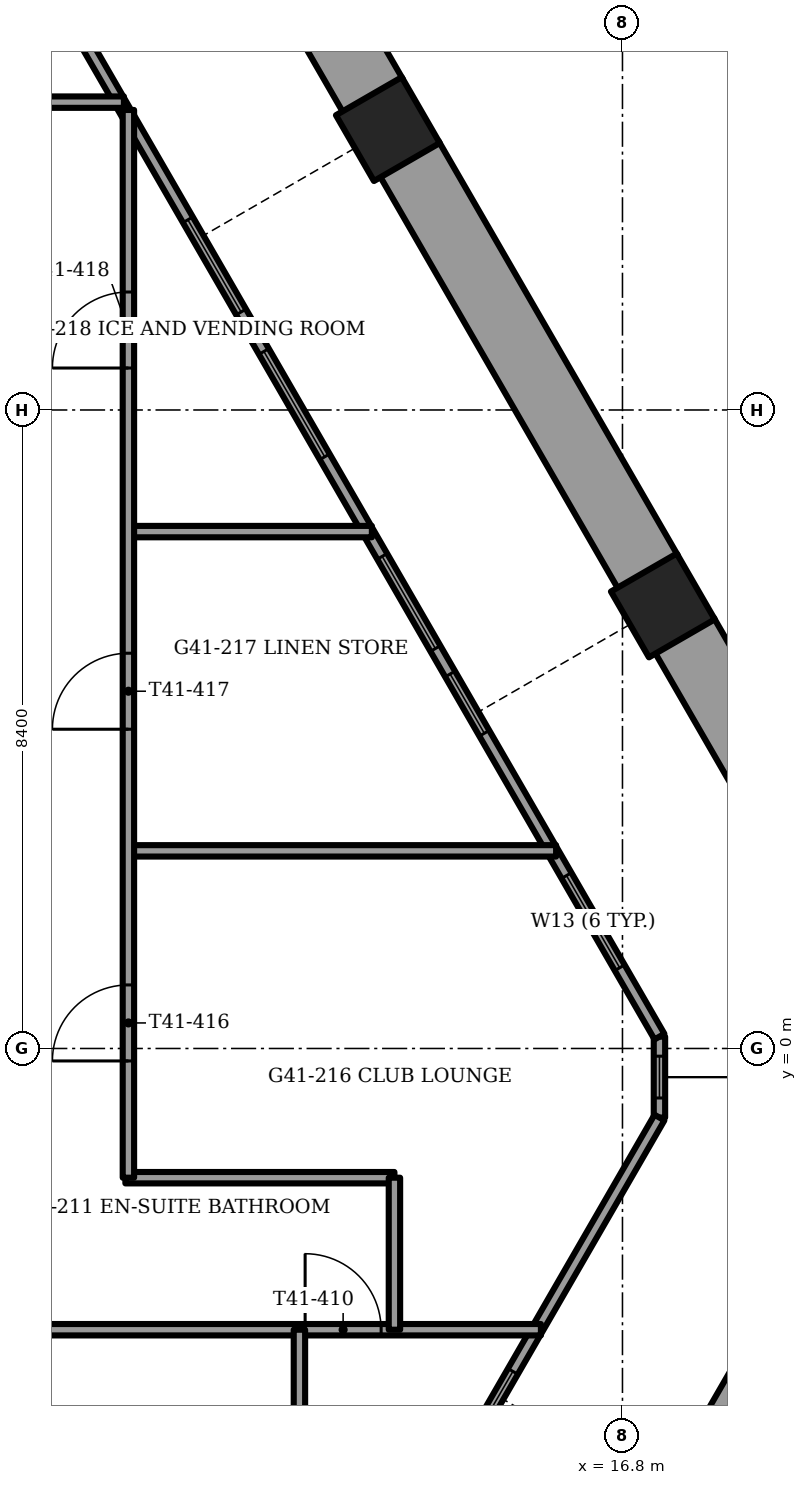
"""IFC4 building model, lengths in metres.
Left out: names, types, materials, properties, quantities, classifications, styles, units other than length and angle.
Written with IfcOpenShell. Run it as: python <this file> out.ifc"""

import sys

from ifc_helpers import new_model, si_unit, direction, frame, frame_2d, origin, origin_2d, place, context, subcontext, project, spatial, rectangle, extrude, element, fill, save


model = new_model("IFC4")
c1 = context("Model", 3, precision=1e-05, world=origin(), true_north=direction((0.0, 1.0)))
c2 = subcontext(c1, "Body", "Model", "MODEL_VIEW")
j1 = project(units=[si_unit("LENGTHUNIT", "METRE"), si_unit("PLANEANGLEUNIT", "RADIAN")], contexts=[c1])
p1 = place(None, origin())
s1 = spatial("IfcSite", under=j1, at=p1, CompositionType="ELEMENT")
p2 = place(p1, origin())
s2 = spatial("IfcBuilding", under=s1, at=p2, CompositionType="ELEMENT")
p3 = place(p2, frame((0.0, 0.0, 168.25)))
s3 = spatial("IfcBuildingStorey", under=s2, at=p3, CompositionType="ELEMENT", Elevation=168.25)
for number, where, z_axis, x_axis in (
    (1, (17.331, 5.829, -1.2), (0.0, 0.0, 1.0), (0.5, -0.866, 0.0)),
    (2, (13.713, 12.095, -1.2), (0.0, 0.0, 1.0), (0.5, -0.866, 0.0)),
):
    element("IfcColumn", number, at=place(p3, frame(where, z_axis=z_axis, x_axis=x_axis)), inside=s3, PredefinedType="COLUMN", context=c2, shape_type="SweptSolid", body=[
        extrude(rectangle(XDim=1.0, YDim=1.0, at=origin_2d()), origin(), (0.0, 0.0, 1.0), 3.75),
    ])
p4 = place(p3, frame((17.936, -5.635, 0.0), z_axis=(0.0, 0.0, 1.0), x_axis=(0.500014212531, 0.86601719802, 0.0)))
e3 = element("IfcWall", 3, at=p4, inside=s3, PredefinedType="PARAPET", context=c2, shape_type="SweptSolid", body=[
    extrude(rectangle(XDim=5.529, YDim=0.9, at=frame_2d((2.765, 0.0))), origin(), (0.0, 0.0, 1.0), 1.1),
])
p5 = place(p3, frame((20.7, 0.093, 0.0), z_axis=(0.0, 0.0, 1.0), x_axis=(-0.500000533151, 0.866025095969, 0.0)))
e4 = element("IfcWall", 4, at=p5, inside=s3, PredefinedType="PARAPET", context=c2, shape_type="SweptSolid", body=[
    extrude(rectangle(XDim=6.181, YDim=0.9, at=frame_2d((3.091, 0.0))), origin(), (0.0, 0.0, 1.0), 1.1),
])
p6 = place(p3, frame((17.14, 6.26, 0.0), z_axis=(0.0, 0.0, 1.0), x_axis=(-0.499984268907, 0.866034485945, 0.0)))
e5 = element("IfcWall", 5, at=p6, inside=s3, PredefinedType="PARAPET", context=c2, shape_type="SweptSolid", body=[
    extrude(rectangle(XDim=6.296, YDim=0.9, at=frame_2d((3.148, 0.0))), origin(), (0.0, 0.0, 1.0), 1.1),
])
p7 = place(p3, frame((13.521, 12.527, 0.0), z_axis=(0.0, 0.0, 1.0), x_axis=(-0.49998343065, 0.866034969892, 0.0)))
e6 = element("IfcWall", 6, at=p7, inside=s3, PredefinedType="PARAPET", context=c2, shape_type="SweptSolid", body=[
    extrude(rectangle(XDim=6.181, YDim=0.9, at=frame_2d((3.091, 0.0))), origin(), (0.0, 0.0, 1.0), 1.1),
])
p8 = place(p3, frame((9.43, -14.516, 0.0), z_axis=(0.0, 0.0, 1.0), x_axis=(0.500004460396, 0.866022828558, 0.0)))
e7 = element("IfcWall", 7, at=p8, inside=s3, PredefinedType="SOLIDWALL", context=c2, shape_type="SweptSolid", body=[
    extrude(rectangle(XDim=15.712, YDim=0.15, at=frame_2d((7.856, 0.0))), origin(), (0.0, 0.0, 1.0), 3.45),
])
p9 = place(p8, frame((1.856, 0.0, 0.15)))
e8 = element("IfcOpeningElement", 8, at=p9, cuts=e7, PredefinedType="OPENING", context=c2, shape_type="SweptSolid", body=[
    extrude(rectangle(XDim=1.6, YDim=2.85, at=frame_2d((0.8, 1.425))), frame((0.0, 0.075, 0.0), z_axis=(0.0, -1.0, 0.0), x_axis=(1.0, 0.0, 0.0)), (0.0, 0.0, 1.0), 0.15),
])
p10 = place(p8, frame((4.056, 0.0, 0.0)))
e9 = element("IfcOpeningElement", 9, at=p10, cuts=e7, PredefinedType="OPENING", context=c2, shape_type="SweptSolid", body=[
    extrude(rectangle(XDim=1.4, YDim=2.4, at=frame_2d((0.7, 1.2))), frame((0.0, 0.075, 0.0), z_axis=(0.0, -1.0, 0.0), x_axis=(1.0, 0.0, 0.0)), (0.0, 0.0, 1.0), 0.15),
])
p11 = place(p8, frame((6.056, 0.0, 0.15)))
e10 = element("IfcOpeningElement", 10, at=p11, cuts=e7, PredefinedType="OPENING", context=c2, shape_type="SweptSolid", body=[
    extrude(rectangle(XDim=1.6, YDim=2.85, at=frame_2d((0.8, 1.425))), frame((0.0, 0.075, 0.0), z_axis=(0.0, -1.0, 0.0), x_axis=(1.0, 0.0, 0.0)), (0.0, 0.0, 1.0), 0.15),
])
p12 = place(p8, frame((8.256, 0.0, 0.0)))
e11 = element("IfcOpeningElement", 11, at=p12, cuts=e7, PredefinedType="OPENING", context=c2, shape_type="SweptSolid", body=[
    extrude(rectangle(XDim=1.4, YDim=2.4, at=frame_2d((0.7, 1.2))), frame((0.0, 0.075, 0.0), z_axis=(0.0, -1.0, 0.0), x_axis=(1.0, 0.0, 0.0)), (0.0, 0.0, 1.0), 0.15),
])
p13 = place(p8, frame((10.256, 0.0, 0.15)))
e12 = element("IfcOpeningElement", 12, at=p13, cuts=e7, PredefinedType="OPENING", context=c2, shape_type="SweptSolid", body=[
    extrude(rectangle(XDim=1.6, YDim=2.85, at=frame_2d((0.8, 1.425))), frame((0.0, 0.075, 0.0), z_axis=(0.0, -1.0, 0.0), x_axis=(1.0, 0.0, 0.0)), (0.0, 0.0, 1.0), 0.15),
])
p14 = place(p3, frame((17.287, 0.156, 0.0), z_axis=(0.0, 0.0, 1.0), x_axis=(-0.500001917853, 0.866024296509, 0.0)))
e13 = element("IfcWall", 13, at=p14, inside=s3, PredefinedType="SOLIDWALL", context=c2, shape_type="SweptSolid", body=[
    extrude(rectangle(XDim=19.788, YDim=0.15, at=frame_2d((9.894, 0.0))), origin(), (0.0, 0.0, 1.0), 3.45),
])
p15 = place(p14, frame((1.046, 0.0, 0.15)))
e14 = element("IfcOpeningElement", 14, at=p15, cuts=e13, PredefinedType="OPENING", context=c2, shape_type="SweptSolid", body=[
    extrude(rectangle(XDim=1.4, YDim=2.85, at=frame_2d((0.7, 1.425))), frame((0.0, 0.075, 0.0), z_axis=(0.0, -1.0, 0.0), x_axis=(1.0, 0.0, 0.0)), (0.0, 0.0, 1.0), 0.15),
])
p16 = place(p14, frame((4.608, 0.0, 0.15)))
e15 = element("IfcOpeningElement", 15, at=p16, cuts=e13, PredefinedType="OPENING", context=c2, shape_type="SweptSolid", body=[
    extrude(rectangle(XDim=0.9, YDim=2.85, at=frame_2d((0.45, 1.425))), frame((0.0, 0.075, 0.0), z_axis=(0.0, -1.0, 0.0), x_axis=(1.0, 0.0, 0.0)), (0.0, 0.0, 1.0), 0.15),
])
p17 = place(p14, frame((5.896, 0.0, 0.15)))
e16 = element("IfcOpeningElement", 16, at=p17, cuts=e13, PredefinedType="OPENING", context=c2, shape_type="SweptSolid", body=[
    extrude(rectangle(XDim=1.4, YDim=2.85, at=frame_2d((0.7, 1.425))), frame((0.0, 0.075, 0.0), z_axis=(0.0, -1.0, 0.0), x_axis=(1.0, 0.0, 0.0)), (0.0, 0.0, 1.0), 0.15),
])
p18 = place(p14, frame((8.808, 0.0, 0.15)))
e17 = element("IfcOpeningElement", 17, at=p18, cuts=e13, PredefinedType="OPENING", context=c2, shape_type="SweptSolid", body=[
    extrude(rectangle(XDim=1.6, YDim=2.85, at=frame_2d((0.8, 1.425))), frame((0.0, 0.075, 0.0), z_axis=(0.0, -1.0, 0.0), x_axis=(1.0, 0.0, 0.0)), (0.0, 0.0, 1.0), 0.15),
])
p19 = place(p14, frame((11.008, 0.0, 0.15)))
e18 = element("IfcOpeningElement", 18, at=p19, cuts=e13, PredefinedType="OPENING", context=c2, shape_type="SweptSolid", body=[
    extrude(rectangle(XDim=1.4, YDim=2.85, at=frame_2d((0.7, 1.425))), frame((0.0, 0.075, 0.0), z_axis=(0.0, -1.0, 0.0), x_axis=(1.0, 0.0, 0.0)), (0.0, 0.0, 1.0), 0.15),
])
p20 = place(p14, frame((15.208, 0.0, 0.0)))
e19 = element("IfcOpeningElement", 19, at=p20, cuts=e13, PredefinedType="OPENING", context=c2, shape_type="SweptSolid", body=[
    extrude(rectangle(XDim=1.4, YDim=2.4, at=frame_2d((0.7, 1.2))), frame((0.0, 0.075, 0.0), z_axis=(0.0, -1.0, 0.0), x_axis=(1.0, 0.0, 0.0)), (0.0, 0.0, 1.0), 0.15),
])
p21 = place(p14, frame((18.019, 0.0, 0.15)))
e20 = element("IfcOpeningElement", 20, at=p21, cuts=e13, PredefinedType="OPENING", context=c2, shape_type="SweptSolid", body=[
    extrude(rectangle(XDim=1.6, YDim=2.73, at=frame_2d((0.8, 1.365))), frame((0.0, 0.075, 0.0), z_axis=(0.0, -1.0, 0.0), x_axis=(1.0, 0.0, 0.0)), (0.0, 0.0, 1.0), 0.15),
])
p22 = place(p3, frame((17.287, -0.909, 0.0), z_axis=(0.0, 0.0, 1.0), x_axis=(0.0, 1.0, 0.0)))
e21 = element("IfcWall", 21, at=p22, inside=s3, PredefinedType="SOLIDWALL", context=c2, shape_type="SweptSolid", body=[
    extrude(rectangle(XDim=1.065, YDim=0.15, at=frame_2d((0.532, 0.0))), origin(), (0.0, 0.0, 1.0), 3.45),
])
p23 = place(p22, frame((0.258, 0.0, 0.15)))
e22 = element("IfcOpeningElement", 22, at=p23, cuts=e21, PredefinedType="OPENING", context=c2, shape_type="SweptSolid", body=[
    extrude(rectangle(XDim=0.55, YDim=2.85, at=frame_2d((0.275, 1.425))), frame((0.0, 0.075, 0.0), z_axis=(0.0, -1.0, 0.0), x_axis=(1.0, 0.0, 0.0)), (0.0, 0.0, 1.0), 0.15),
])
p24 = place(p3, frame((9.16, -3.7, 0.0), z_axis=(0.0, 0.0, 1.0), x_axis=(1.0, 0.0, 0.0)))
e23 = element("IfcWall", 23, at=p24, inside=s3, PredefinedType="PARTITIONING", context=c2, shape_type="SweptSolid", body=[
    extrude(rectangle(XDim=6.567, YDim=0.15, at=frame_2d((3.284, 0.0))), origin(), (0.0, 0.0, 1.0), 3.45),
])
p25 = place(p24, frame((3.465, 0.0, 0.0)))
e24 = element("IfcOpeningElement", 24, at=p25, cuts=e23, PredefinedType="OPENING", context=c2, shape_type="SweptSolid", body=[
    extrude(rectangle(XDim=1.0, YDim=2.1, at=frame_2d((0.5, 1.05))), frame((0.0, 0.075, 0.0), z_axis=(0.0, -1.0, 0.0), x_axis=(1.0, 0.0, 0.0)), (0.0, 0.0, 1.0), 0.15),
])
p26 = place(p3, frame((10.26, -1.7, 0.0), z_axis=(0.0, 0.0, 1.0), x_axis=(1.0, 0.0, 0.0)))
e25 = element("IfcWall", 25, at=p26, inside=s3, PredefinedType="PARTITIONING", context=c2, shape_type="SweptSolid", body=[
    extrude(rectangle(XDim=3.54, YDim=0.15, at=frame_2d((1.77, 0.0))), origin(), (0.0, 0.0, 1.0), 3.45),
])
p27 = place(p3, frame((10.3, 2.6, 0.0), z_axis=(0.0, 0.0, 1.0), x_axis=(1.0, 0.0, 0.0)))
e26 = element("IfcWall", 26, at=p27, inside=s3, PredefinedType="PARTITIONING", context=c2, shape_type="SweptSolid", body=[
    extrude(rectangle(XDim=5.627, YDim=0.15, at=frame_2d((2.813, 0.0))), origin(), (0.0, 0.0, 1.0), 3.45),
])
p28 = place(p3, frame((10.3, 6.8, 0.0), z_axis=(0.0, 0.0, 1.0), x_axis=(1.0, 0.0, 0.0)))
e27 = element("IfcWall", 27, at=p28, inside=s3, PredefinedType="PARTITIONING", context=c2, shape_type="SweptSolid", body=[
    extrude(rectangle(XDim=3.203, YDim=0.15, at=frame_2d((1.602, 0.0))), origin(), (0.0, 0.0, 1.0), 3.45),
])
p29 = place(p3, frame((8.51, 12.45, 0.0), z_axis=(0.0, 0.0, 1.0), x_axis=(1.0, 0.0, 0.0)))
e28 = element("IfcWall", 28, at=p29, inside=s3, PredefinedType="PARTITIONING", context=c2, shape_type="SweptSolid", body=[
    extrude(rectangle(XDim=1.731, YDim=0.15, at=frame_2d((0.865, 0.0))), origin(), (0.0, 0.0, 1.0), 3.45),
])
p30 = place(p3, frame((13.8, -3.7, 0.0), z_axis=(0.0, 0.0, 1.0), x_axis=(0.0, 1.0, 0.0)))
e29 = element("IfcWall", 29, at=p30, inside=s3, PredefinedType="PARTITIONING", context=c2, shape_type="SweptSolid", body=[
    extrude(rectangle(XDim=2.0, YDim=0.15, at=frame_2d((1.0, 0.0))), origin(), (0.0, 0.0, 1.0), 3.45),
])
p31 = place(p3, frame((12.55, -7.3, 0.0), z_axis=(0.0, 0.0, 1.0), x_axis=(0.0, 1.0, 0.0)))
e30 = element("IfcWall", 30, at=p31, inside=s3, PredefinedType="PARTITIONING", context=c2, shape_type="SweptSolid", body=[
    extrude(rectangle(XDim=3.6, YDim=0.15, at=frame_2d((1.8, 0.0))), origin(), (0.0, 0.0, 1.0), 3.45),
])
p32 = place(p31, frame((1.4, 0.0, 0.0)))
e31 = element("IfcOpeningElement", 31, at=p32, cuts=e30, PredefinedType="OPENING", context=c2, shape_type="SweptSolid", body=[
    extrude(rectangle(XDim=0.8, YDim=2.1, at=frame_2d((0.4, 1.05))), frame((0.0, 0.075, 0.0), z_axis=(0.0, -1.0, 0.0), x_axis=(1.0, 0.0, 0.0)), (0.0, 0.0, 1.0), 0.15),
])
p33 = place(p3, frame((10.3, -1.7, 0.0), z_axis=(0.0, 0.0, 1.0), x_axis=(0.0, 1.0, 0.0)))
e32 = element("IfcWall", 32, at=p33, inside=s3, PredefinedType="PARTITIONING", context=c2, shape_type="SweptSolid", body=[
    extrude(rectangle(XDim=14.047, YDim=0.15, at=frame_2d((7.023, 0.0))), origin(), (0.0, 0.0, 1.0), 3.45),
])
p34 = place(p33, frame((1.536, 0.0, 0.0)))
e33 = element("IfcOpeningElement", 33, at=p34, cuts=e32, PredefinedType="OPENING", context=c2, shape_type="SweptSolid", body=[
    extrude(rectangle(XDim=1.0, YDim=2.1, at=frame_2d((0.5, 1.05))), frame((0.0, 0.075, 0.0), z_axis=(0.0, -1.0, 0.0), x_axis=(1.0, 0.0, 0.0)), (0.0, 0.0, 1.0), 0.15),
])
p35 = place(p33, frame((5.9, 0.0, 0.0)))
e34 = element("IfcOpeningElement", 34, at=p35, cuts=e32, PredefinedType="OPENING", context=c2, shape_type="SweptSolid", body=[
    extrude(rectangle(XDim=1.0, YDim=2.1, at=frame_2d((0.5, 1.05))), frame((0.0, 0.075, 0.0), z_axis=(0.0, -1.0, 0.0), x_axis=(1.0, 0.0, 0.0)), (0.0, 0.0, 1.0), 0.15),
])
p36 = place(p33, frame((10.652, 0.0, 0.0)))
e35 = element("IfcOpeningElement", 35, at=p36, cuts=e32, PredefinedType="OPENING", context=c2, shape_type="SweptSolid", body=[
    extrude(rectangle(XDim=1.0, YDim=2.1, at=frame_2d((0.5, 1.05))), frame((0.0, 0.075, 0.0), z_axis=(0.0, -1.0, 0.0), x_axis=(1.0, 0.0, 0.0)), (0.0, 0.0, 1.0), 0.15),
])
p37 = place(p13, origin())
e36 = element("IfcWindow", 36, at=p37, inside=s3, PartitioningType="SINGLE_PANEL", PredefinedType="WINDOW", context=c2, shape_type="SweptSolid", body=[
    extrude(rectangle(XDim=1.6, YDim=2.85, at=frame_2d((0.8, 1.425))), frame((0.0, 0.03, 0.0), z_axis=(0.0, -1.0, 0.0), x_axis=(1.0, 0.0, 0.0)), (0.0, 0.0, 1.0), 0.06),
])
fill(e12, e36)
p38 = place(p15, origin())
e37 = element("IfcWindow", 37, at=p38, inside=s3, PartitioningType="SINGLE_PANEL", PredefinedType="WINDOW", context=c2, shape_type="SweptSolid", body=[
    extrude(rectangle(XDim=1.4, YDim=2.85, at=frame_2d((0.7, 1.425))), frame((0.0, 0.03, 0.0), z_axis=(0.0, -1.0, 0.0), x_axis=(1.0, 0.0, 0.0)), (0.0, 0.0, 1.0), 0.06),
])
fill(e14, e37)
p39 = place(p16, origin())
e38 = element("IfcWindow", 38, at=p39, inside=s3, PartitioningType="SINGLE_PANEL", PredefinedType="WINDOW", context=c2, shape_type="SweptSolid", body=[
    extrude(rectangle(XDim=0.9, YDim=2.85, at=frame_2d((0.45, 1.425))), frame((0.0, 0.03, 0.0), z_axis=(0.0, -1.0, 0.0), x_axis=(1.0, 0.0, 0.0)), (0.0, 0.0, 1.0), 0.06),
])
fill(e15, e38)
p40 = place(p17, origin())
e39 = element("IfcWindow", 39, at=p40, inside=s3, PartitioningType="SINGLE_PANEL", PredefinedType="WINDOW", context=c2, shape_type="SweptSolid", body=[
    extrude(rectangle(XDim=1.4, YDim=2.85, at=frame_2d((0.7, 1.425))), frame((0.0, 0.03, 0.0), z_axis=(0.0, -1.0, 0.0), x_axis=(1.0, 0.0, 0.0)), (0.0, 0.0, 1.0), 0.06),
])
fill(e16, e39)
p41 = place(p18, origin())
e40 = element("IfcWindow", 40, at=p41, inside=s3, PartitioningType="SINGLE_PANEL", PredefinedType="WINDOW", context=c2, shape_type="SweptSolid", body=[
    extrude(rectangle(XDim=1.6, YDim=2.85, at=frame_2d((0.8, 1.425))), frame((0.0, 0.03, 0.0), z_axis=(0.0, -1.0, 0.0), x_axis=(1.0, 0.0, 0.0)), (0.0, 0.0, 1.0), 0.06),
])
fill(e17, e40)
p42 = place(p19, origin())
e41 = element("IfcWindow", 41, at=p42, inside=s3, PartitioningType="SINGLE_PANEL", PredefinedType="WINDOW", context=c2, shape_type="SweptSolid", body=[
    extrude(rectangle(XDim=1.4, YDim=2.85, at=frame_2d((0.7, 1.425))), frame((0.0, 0.03, 0.0), z_axis=(0.0, -1.0, 0.0), x_axis=(1.0, 0.0, 0.0)), (0.0, 0.0, 1.0), 0.06),
])
fill(e18, e41)
p43 = place(p23, origin())
e42 = element("IfcWindow", 42, at=p43, inside=s3, PartitioningType="SINGLE_PANEL", PredefinedType="WINDOW", context=c2, shape_type="SweptSolid", body=[
    extrude(rectangle(XDim=0.55, YDim=2.85, at=frame_2d((0.275, 1.425))), frame((0.0, 0.03, 0.0), z_axis=(0.0, -1.0, 0.0), x_axis=(1.0, 0.0, 0.0)), (0.0, 0.0, 1.0), 0.06),
])
fill(e22, e42)
p44 = place(p25, origin())
e43 = element("IfcDoor", 43, at=p44, inside=s3, OperationType="SINGLE_SWING_RIGHT", PredefinedType="DOOR", context=c2, shape_type="SweptSolid", body=[
    extrude(rectangle(XDim=1.0, YDim=2.1, at=frame_2d((0.5, 1.05))), frame((0.0, 0.025, 0.0), z_axis=(0.0, -1.0, 0.0), x_axis=(1.0, 0.0, 0.0)), (0.0, 0.0, 1.0), 0.05),
])
fill(e24, e43)
p45 = place(p34, origin())
e44 = element("IfcDoor", 44, at=p45, inside=s3, OperationType="SINGLE_SWING_LEFT", PredefinedType="DOOR", context=c2, shape_type="SweptSolid", body=[
    extrude(rectangle(XDim=1.0, YDim=2.1, at=frame_2d((0.5, 1.05))), frame((0.0, 0.025, 0.0), z_axis=(0.0, -1.0, 0.0), x_axis=(1.0, 0.0, 0.0)), (0.0, 0.0, 1.0), 0.05),
])
fill(e33, e44)
p46 = place(p35, origin())
e45 = element("IfcDoor", 45, at=p46, inside=s3, OperationType="SINGLE_SWING_LEFT", PredefinedType="DOOR", context=c2, shape_type="SweptSolid", body=[
    extrude(rectangle(XDim=1.0, YDim=2.1, at=frame_2d((0.5, 1.05))), frame((0.0, 0.025, 0.0), z_axis=(0.0, -1.0, 0.0), x_axis=(1.0, 0.0, 0.0)), (0.0, 0.0, 1.0), 0.05),
])
fill(e34, e45)
p47 = place(p36, origin())
e46 = element("IfcDoor", 46, at=p47, inside=s3, OperationType="SINGLE_SWING_LEFT", PredefinedType="DOOR", context=c2, shape_type="SweptSolid", body=[
    extrude(rectangle(XDim=1.0, YDim=2.1, at=frame_2d((0.5, 1.05))), frame((0.0, 0.025, 0.0), z_axis=(0.0, -1.0, 0.0), x_axis=(1.0, 0.0, 0.0)), (0.0, 0.0, 1.0), 0.05),
])
fill(e35, e46)
save(model, sys.argv[1])
